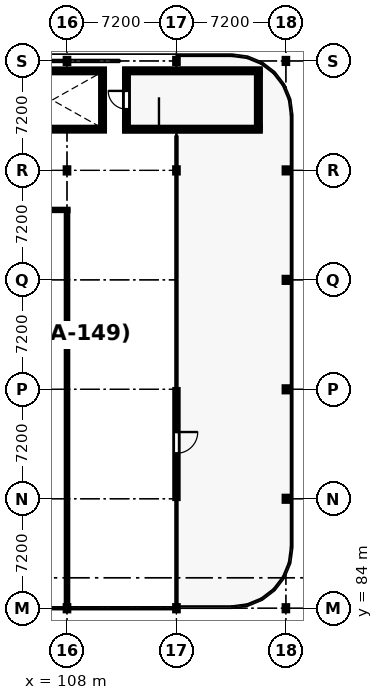
"""IFC4 building model, lengths in metres.
Left out: names, types, materials, properties, quantities, classifications, styles, units other than length and angle.
Written with IfcOpenShell. Run it as: python <this file> out.ifc"""

import sys

from ifc_helpers import new_model, si_unit, direction, frame, frame_2d, origin, origin_2d, place, context, subcontext, project, spatial, rectangle, i_section, extrude, element, fill, save


model = new_model("IFC4")
c1 = context("Model", 3, precision=1e-05, world=origin(), true_north=direction((0.0, 1.0)))
c2 = subcontext(c1, "Body", "Model", "MODEL_VIEW")
j1 = project(units=[si_unit("LENGTHUNIT", "METRE"), si_unit("PLANEANGLEUNIT", "RADIAN")], contexts=[c1])
p1 = place(None, origin())
s1 = spatial("IfcSite", under=j1, at=p1, CompositionType="ELEMENT")
p2 = place(p1, origin())
s2 = spatial("IfcBuilding", under=s1, at=p2, CompositionType="ELEMENT")
p3 = place(p2, frame((0.0, 0.0, 21.0)))
s3 = spatial("IfcBuildingStorey", under=s2, at=p3, CompositionType="ELEMENT", Elevation=21.0)
for number, where, z_axis, x_axis in (
    (1, (108.0, 84.0, 0.0), (0.0, 0.0, 1.0), (1.0, 0.0, 0.0)),
    (2, (108.0, 112.8, 0.0), (0.0, 0.0, 1.0), (1.0, 0.0, 0.0)),
):
    element("IfcColumn", number, at=place(p3, frame(where, z_axis=z_axis, x_axis=x_axis)), inside=s3, PredefinedType="COLUMN", context=c2, shape_type="SweptSolid", body=[
        extrude(i_section(OverallWidth=0.257, OverallDepth=0.363, WebThickness=0.013, FlangeThickness=0.022, FilletRadius=0.015, at=origin_2d()), origin(), (0.0, 0.0, 1.0), 3.3),
    ])
p4 = place(p3, frame((108.0, 120.0, 0.0), z_axis=(0.0, 0.0, 1.0), x_axis=(1.0, 0.0, 0.0)))
e3 = element("IfcColumn", 3, at=p4, inside=s3, PredefinedType="COLUMN", context=c2, shape_type="SweptSolid", body=[
    extrude(i_section(OverallWidth=0.257, OverallDepth=0.363, WebThickness=0.013, FlangeThickness=0.022, FilletRadius=0.015, at=origin_2d()), origin(), (0.0, 0.0, 1.0), 4.8),
])
for number, where, z_axis, x_axis in (
    (4, (115.2, 84.0, 0.0), (0.0, 0.0, 1.0), (1.0, 0.0, 0.0)),
    (5, (115.2, 112.8, 0.0), (0.0, 0.0, 1.0), (1.0, 0.0, 0.0)),
):
    element("IfcColumn", number, at=place(p3, frame(where, z_axis=z_axis, x_axis=x_axis)), inside=s3, PredefinedType="COLUMN", context=c2, shape_type="SweptSolid", body=[
        extrude(i_section(OverallWidth=0.257, OverallDepth=0.363, WebThickness=0.013, FlangeThickness=0.022, FilletRadius=0.015, at=origin_2d()), origin(), (0.0, 0.0, 1.0), 3.3),
    ])
p5 = place(p3, frame((115.2, 120.0, 0.0), z_axis=(0.0, 0.0, 1.0), x_axis=(1.0, 0.0, 0.0)))
e6 = element("IfcColumn", 6, at=p5, inside=s3, PredefinedType="COLUMN", context=c2, shape_type="SweptSolid", body=[
    extrude(i_section(OverallWidth=0.257, OverallDepth=0.363, WebThickness=0.013, FlangeThickness=0.022, FilletRadius=0.015, at=origin_2d()), origin(), (0.0, 0.0, 1.0), 4.8),
])
for number, where, z_axis, x_axis in (
    (7, (122.4, 84.0, 0.0), (0.0, 0.0, 1.0), (1.0, 0.0, 0.0)),
    (8, (122.4, 91.2, 0.0), (0.0, 0.0, 1.0), (1.0, 0.0, 0.0)),
    (9, (122.4, 98.4, 0.0), (0.0, 0.0, 1.0), (1.0, 0.0, 0.0)),
    (10, (122.4, 105.6, 0.0), (0.0, 0.0, 1.0), (1.0, 0.0, 0.0)),
    (11, (122.4, 112.8, 0.0), (0.0, 0.0, 1.0), (1.0, 0.0, 0.0)),
    (12, (122.4, 120.0, 0.0), (0.0, 0.0, 1.0), (1.0, 0.0, 0.0)),
):
    element("IfcColumn", number, at=place(p3, frame(where, z_axis=z_axis, x_axis=x_axis)), inside=s3, PredefinedType="COLUMN", context=c2, shape_type="SweptSolid", body=[
        extrude(i_section(OverallWidth=0.254, OverallDepth=0.356, WebThickness=0.01, FlangeThickness=0.018, FilletRadius=0.015, at=origin_2d()), origin(), (0.0, 0.0, 1.0), 3.3),
    ])
p6 = place(p3, frame((115.2, 98.398, 0.0), z_axis=(0.0, 0.0, 1.0), x_axis=(0.0, -1.0, 0.0)))
e13 = element("IfcWall", 13, at=p6, inside=s3, PredefinedType="STANDARD", context=c2, shape_type="SweptSolid", body=[
    extrude(rectangle(XDim=7.196, YDim=0.24, at=frame_2d((3.598, 0.0))), origin(), (0.0, 0.0, 1.0), 2.5),
])
p7 = place(p6, frame((2.808, 0.0, 0.0)))
e14 = element("IfcOpeningElement", 14, at=p7, cuts=e13, PredefinedType="OPENING", context=c2, shape_type="SweptSolid", body=[
    extrude(rectangle(XDim=1.4, YDim=2.15, at=frame_2d((0.7, 1.075))), frame((0.0, 0.13, 0.0), z_axis=(0.0, -1.0, 0.0), x_axis=(1.0, 0.0, 0.0)), (0.0, 0.0, 1.0), 0.26),
])
for number, where, z_axis, x_axis in (
    (15, (110.475, 115.512, 0.0), (0.0, 0.0, 1.0), (-1.0, 0.0, 0.0)),
    (16, (101.575, 119.348, 0.0), (0.0, 0.0, 1.0), (1.0, 0.0, 0.0)),
):
    element("IfcWall", number, at=place(p3, frame(where, z_axis=z_axis, x_axis=x_axis)), inside=s3, PredefinedType="SOLIDWALL", context=c2, shape_type="SweptSolid", body=[
        extrude(rectangle(XDim=8.9, YDim=0.275, at=frame_2d((4.45, 0.0))), origin(), (0.0, 0.0, 1.0), 2.6),
    ])
p8 = place(p3, frame((110.338, 119.21, 0.0), z_axis=(0.0, 0.0, 1.0), x_axis=(0.0, -1.0, 0.0)))
e17 = element("IfcWall", 17, at=p8, inside=s3, PredefinedType="SOLIDWALL", context=c2, shape_type="SweptSolid", body=[
    extrude(rectangle(XDim=3.56, YDim=0.275, at=frame_2d((1.78, 0.0))), origin(), (0.0, 0.0, 1.0), 2.6),
])
for number, where, z_axis, x_axis in (
    (18, (120.725, 115.512, 0.0), (0.0, 0.0, 1.0), (-1.0, 0.0, 0.0)),
    (19, (111.775, 119.348, 0.0), (0.0, 0.0, 1.0), (1.0, 0.0, 0.0)),
):
    element("IfcWall", number, at=place(p3, frame(where, z_axis=z_axis, x_axis=x_axis)), inside=s3, PredefinedType="SOLIDWALL", context=c2, shape_type="SweptSolid", body=[
        extrude(rectangle(XDim=8.95, YDim=0.275, at=frame_2d((4.475, 0.0))), origin(), (0.0, 0.0, 1.0), 2.25),
    ])
p9 = place(p3, frame((111.912, 115.65, 0.0), z_axis=(0.0, 0.0, 1.0), x_axis=(0.0, 1.0, 0.0)))
e20 = element("IfcWall", 20, at=p9, inside=s3, PredefinedType="SOLIDWALL", context=c2, shape_type="SweptSolid", body=[
    extrude(rectangle(XDim=3.56, YDim=0.275, at=frame_2d((1.78, 0.0))), origin(), (0.0, 0.0, 1.0), 2.25),
])
p10 = place(p9, frame((1.18, 0.0, 0.0)))
e21 = element("IfcOpeningElement", 21, at=p10, cuts=e20, PredefinedType="OPENING", context=c2, shape_type="SweptSolid", body=[
    extrude(rectangle(XDim=1.2, YDim=2.2, at=frame_2d((0.6, 1.1))), frame((0.0, 0.147, 0.0), z_axis=(0.0, -1.0, 0.0), x_axis=(1.0, 0.0, 0.0)), (0.0, 0.0, 1.0), 0.295),
])
p11 = place(p3, frame((120.588, 119.21, 0.0), z_axis=(0.0, 0.0, 1.0), x_axis=(0.0, -1.0, 0.0)))
e22 = element("IfcWall", 22, at=p11, inside=s3, PredefinedType="SOLIDWALL", context=c2, shape_type="SweptSolid", body=[
    extrude(rectangle(XDim=3.56, YDim=0.275, at=frame_2d((1.78, 0.0))), origin(), (0.0, 0.0, 1.0), 2.25),
])
p12 = place(p3, frame((50.32, 110.2, 0.0), z_axis=(0.0, 0.0, 1.0), x_axis=(1.0, 0.0, 0.0)))
e23 = element("IfcWall", 23, at=p12, inside=s3, PredefinedType="PARTITIONING", context=c2, shape_type="SweptSolid", body=[
    extrude(rectangle(XDim=57.76, YDim=0.11, at=frame_2d((28.88, 0.0))), origin(), (0.0, 0.0, 1.0), 2.5),
])
p13 = place(p3, frame((108.0, 110.143, 0.0), z_axis=(0.0, 0.0, 1.0), x_axis=(0.0, -1.0, 0.0)))
e24 = element("IfcWall", 24, at=p13, inside=s3, PredefinedType="PARTITIONING", context=c2, shape_type="SweptSolid", body=[
    extrude(rectangle(XDim=26.021, YDim=0.12, at=frame_2d((13.01, 0.0))), origin(), (0.0, 0.0, 1.0), 2.5),
])
p14 = place(p7, origin())
e25 = element("IfcDoor", 25, at=p14, inside=s3, OperationType="SINGLE_SWING_LEFT", PredefinedType="DOOR", context=c2, shape_type="SweptSolid", body=[
    extrude(rectangle(XDim=1.4, YDim=2.15, at=frame_2d((0.7, 1.075))), frame((0.0, 0.025, 0.0), z_axis=(0.0, -1.0, 0.0), x_axis=(1.0, 0.0, 0.0)), (0.0, 0.0, 1.0), 0.05),
])
fill(e14, e25)
p15 = place(p10, origin())
e26 = element("IfcDoor", 26, at=p15, inside=s3, OperationType="SINGLE_SWING_RIGHT", PredefinedType="DOOR", context=c2, shape_type="SweptSolid", body=[
    extrude(rectangle(XDim=1.2, YDim=2.2, at=frame_2d((0.6, 1.1))), frame((0.0, 0.025, 0.0), z_axis=(0.0, -1.0, 0.0), x_axis=(1.0, 0.0, 0.0)), (0.0, 0.0, 1.0), 0.05),
])
fill(e21, e26)
save(model, sys.argv[1])
